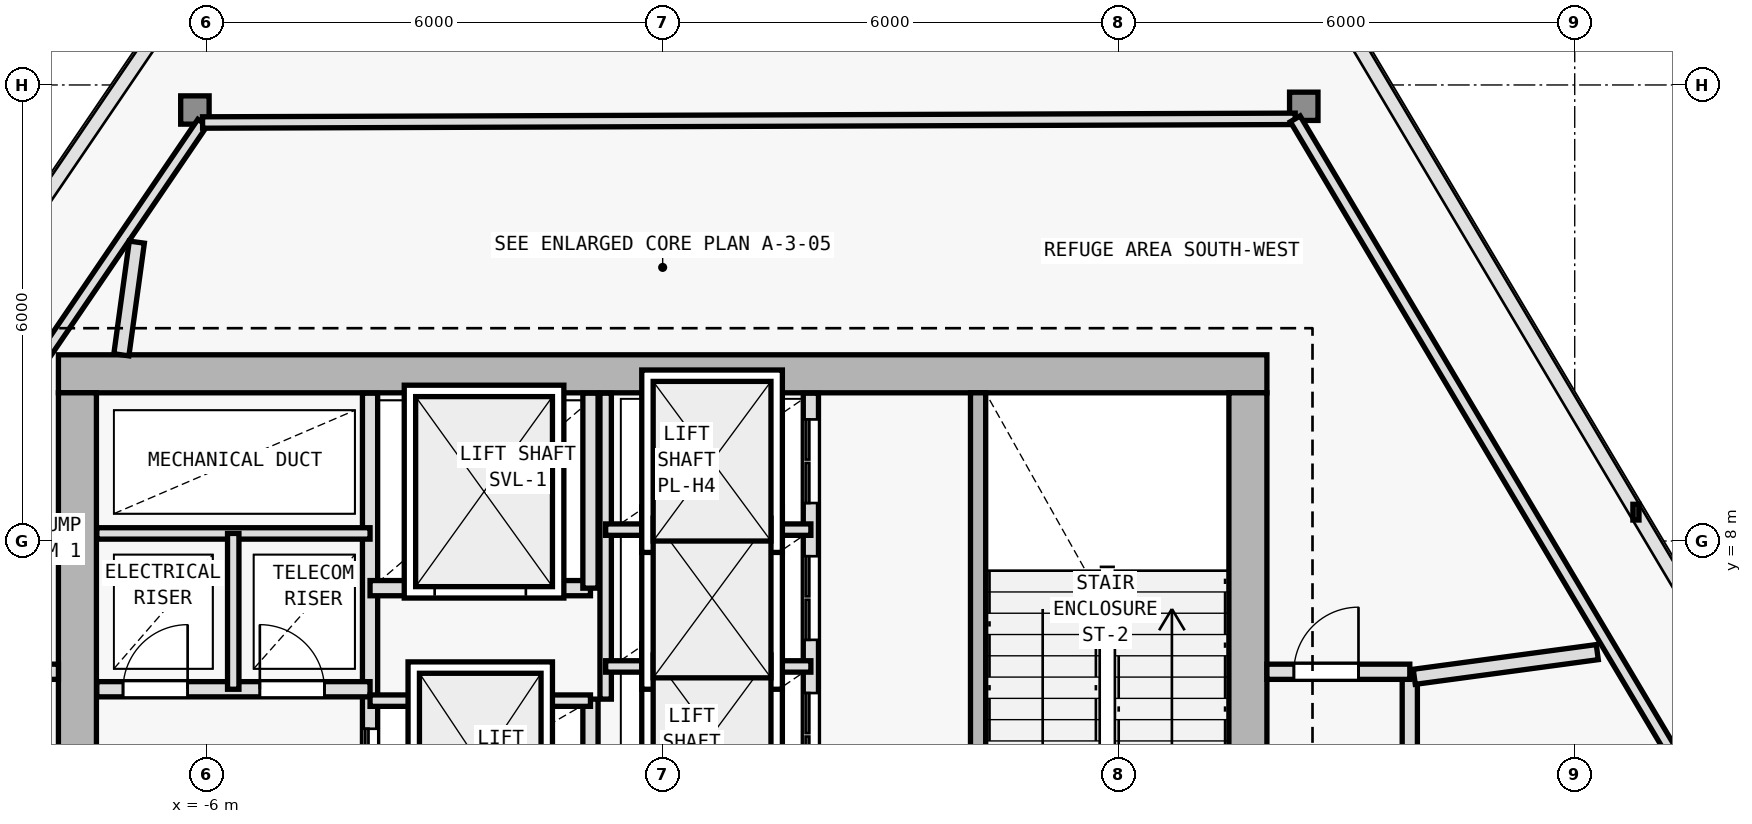
"""IFC4 building model, lengths in metres.
Left out: names, types, materials, properties, quantities, classifications, styles, units other than length and angle.
Written with IfcOpenShell. Run it as: python <this file> out.ifc"""

import sys

from ifc_helpers import new_model, si_unit, direction, frame, frame_2d, origin, origin_2d, place, context, subcontext, project, spatial, rectangle, i_section, extrude, element, fill, save


model = new_model("IFC4")
c1 = context("Model", 3, precision=1e-05, world=origin(), true_north=direction((0.0, 1.0)))
c2 = subcontext(c1, "Body", "Model", "MODEL_VIEW")
j1 = project(units=[si_unit("LENGTHUNIT", "METRE"), si_unit("PLANEANGLEUNIT", "RADIAN")], contexts=[c1])
p1 = place(None, origin())
s1 = spatial("IfcSite", under=j1, at=p1, CompositionType="ELEMENT")
p2 = place(p1, origin())
s2 = spatial("IfcBuilding", under=s1, at=p2, CompositionType="ELEMENT")
p3 = place(p2, frame((0.0, 0.0, 241.5)))
s3 = spatial("IfcBuildingStorey", under=s2, at=p3, CompositionType="ELEMENT", Elevation=241.5)
for number, where, z_axis, x_axis in (
    (1, (7.7, 10.2, 0.0), (0.0, 0.0, 1.0), (1.0, 0.0, 0.0)),
    (2, (-7.7, 10.2, 0.0), (0.0, 0.0, 1.0), (1.0, 0.0, 0.0)),
):
    element("IfcColumn", number, at=place(p3, frame(where, z_axis=z_axis, x_axis=x_axis)), inside=s3, PredefinedType="COLUMN", context=c2, shape_type="SweptSolid", body=[
        extrude(i_section(OverallWidth=0.398, OverallDepth=0.387, WebThickness=0.013, FlangeThickness=0.022, FilletRadius=0.015, at=origin_2d()), origin(), (0.0, 0.0, 1.0), 4.8),
    ])
p4 = place(p3, frame((8.435, 13.719, 0.006), z_axis=(-0.009074296177, -0.001988188488, 0.999956851197), x_axis=(0.214024191307, -0.976828360325, 0.0)))
e3 = element("IfcColumn", 3, at=p4, inside=s3, PredefinedType="COLUMN", context=c2, shape_type="SweptSolid", body=[
    extrude(i_section(OverallWidth=0.374, OverallDepth=0.372, WebThickness=0.012, FlangeThickness=0.02, FilletRadius=0.015, at=origin_2d()), origin(), (0.0, 0.0, 1.0), 4.789),
])
p5 = place(p3, frame((-6.154, 13.671, 0.006), z_axis=(0.006729378041, -0.00198822533, 0.999975380913), x_axis=(0.283346141017, 0.959017708059, 0.0)))
e4 = element("IfcColumn", 4, at=p5, inside=s3, PredefinedType="COLUMN", context=c2, shape_type="SweptSolid", body=[
    extrude(i_section(OverallWidth=0.374, OverallDepth=0.372, WebThickness=0.012, FlangeThickness=0.02, FilletRadius=0.015, at=origin_2d()), origin(), (0.0, 0.0, 1.0), 4.789),
])
p6 = place(p3, frame((7.95, 10.2, 0.0), z_axis=(0.0, 0.0, 1.0), x_axis=(-1.0, 0.0, 0.0)))
e5 = element("IfcWall", 5, at=p6, inside=s3, PredefinedType="SHEAR", context=c2, shape_type="SweptSolid", body=[
    extrude(rectangle(XDim=15.9, YDim=0.5, at=frame_2d((7.95, 0.0))), origin(), (0.0, 0.0, 1.0), 4.5),
])
p7 = place(p3, frame((-7.7, -9.15, 0.0), z_axis=(0.0, 0.0, 1.0), x_axis=(0.0, 1.0, 0.0)))
e6 = element("IfcWall", 6, at=p7, inside=s3, PredefinedType="SHEAR", context=c2, shape_type="SweptSolid", body=[
    extrude(rectangle(XDim=19.1, YDim=0.5, at=frame_2d((9.55, 0.0))), origin(), (0.0, 0.0, 1.0), 4.5),
])
p8 = place(p7, frame((12.7, 0.0, 0.0)))
e7 = element("IfcOpeningElement", 7, at=p8, cuts=e6, PredefinedType="OPENING", context=c2, shape_type="SweptSolid", body=[
    extrude(rectangle(XDim=1.1, YDim=2.15, at=frame_2d((0.55, 1.075))), frame((0.0, 0.26, 0.0), z_axis=(0.0, -1.0, 0.0), x_axis=(1.0, 0.0, 0.0)), (0.0, 0.0, 1.0), 0.52),
])
p9 = place(p3, frame((7.7, 9.95, 0.0), z_axis=(0.0, 0.0, 1.0), x_axis=(0.0, -1.0, 0.0)))
e8 = element("IfcWall", 8, at=p9, inside=s3, PredefinedType="SHEAR", context=c2, shape_type="SweptSolid", body=[
    extrude(rectangle(XDim=19.1, YDim=0.5, at=frame_2d((9.55, 0.0))), origin(), (0.0, 0.0, 1.0), 4.5),
])
p10 = place(p3, frame((-3.85, 1.35, 0.0), z_axis=(0.0, 0.0, 1.0), x_axis=(0.0, 1.0, 0.0)))
e9 = element("IfcWall", 9, at=p10, inside=s3, PredefinedType="SOLIDWALL", context=c2, shape_type="SweptSolid", body=[
    extrude(rectangle(XDim=8.595, YDim=0.2, at=frame_2d((4.297, 0.0))), origin(), (0.0, 0.0, 1.0), 4.5),
])
p11 = place(p10, frame((1.5, 0.0, 0.0)))
e10 = element("IfcOpeningElement", 10, at=p11, cuts=e9, PredefinedType="OPENING", context=c2, shape_type="SweptSolid", body=[
    extrude(rectangle(XDim=1.0, YDim=2.15, at=frame_2d((0.5, 1.075))), frame((0.0, 0.11, 0.0), z_axis=(0.0, -1.0, 0.0), x_axis=(1.0, 0.0, 0.0)), (0.0, 0.0, 1.0), 0.22),
])
p12 = place(p10, frame((3.18, 0.0, 0.0)))
e11 = element("IfcOpeningElement", 11, at=p12, cuts=e9, PredefinedType="OPENING", context=c2, shape_type="SweptSolid", body=[
    extrude(rectangle(XDim=1.0, YDim=2.15, at=frame_2d((0.5, 1.075))), frame((0.0, 0.11, 0.0), z_axis=(0.0, -1.0, 0.0), x_axis=(1.0, 0.0, 0.0)), (0.0, 0.0, 1.0), 0.22),
])
p13 = place(p3, frame((-7.445, 6.05, 0.0), z_axis=(0.0, 0.0, 1.0), x_axis=(1.0, 0.0, 0.0)))
e12 = element("IfcWall", 12, at=p13, inside=s3, PredefinedType="SOLIDWALL", context=c2, shape_type="SweptSolid", body=[
    extrude(rectangle(XDim=3.595, YDim=0.2, at=frame_2d((1.797, 0.0))), origin(), (0.0, 0.0, 1.0), 4.5),
])
p14 = place(p13, frame((0.345, 0.0, 0.0)))
e13 = element("IfcOpeningElement", 13, at=p14, cuts=e12, PredefinedType="OPENING", context=c2, shape_type="SweptSolid", body=[
    extrude(rectangle(XDim=0.85, YDim=2.1, at=frame_2d((0.425, 1.05))), frame((0.0, 0.11, 0.0), z_axis=(0.0, -1.0, 0.0), x_axis=(1.0, 0.0, 0.0)), (0.0, 0.0, 1.0), 0.22),
])
p15 = place(p13, frame((2.145, 0.0, 0.0)))
e14 = element("IfcOpeningElement", 14, at=p15, cuts=e12, PredefinedType="OPENING", context=c2, shape_type="SweptSolid", body=[
    extrude(rectangle(XDim=0.85, YDim=2.1, at=frame_2d((0.425, 1.05))), frame((0.0, 0.11, 0.0), z_axis=(0.0, -1.0, 0.0), x_axis=(1.0, 0.0, 0.0)), (0.0, 0.0, 1.0), 0.22),
])
p16 = place(p3, frame((-7.445, 8.1, 0.0), z_axis=(0.0, 0.0, 1.0), x_axis=(1.0, 0.0, 0.0)))
e15 = element("IfcWall", 15, at=p16, inside=s3, PredefinedType="PARTITIONING", context=c2, shape_type="SweptSolid", body=[
    extrude(rectangle(XDim=3.595, YDim=0.15, at=frame_2d((1.797, 0.0))), origin(), (0.0, 0.0, 1.0), 4.5),
])
p17 = place(p3, frame((-5.65, 6.05, 0.0), z_axis=(0.0, 0.0, 1.0), x_axis=(0.0, 1.0, 0.0)))
e16 = element("IfcWall", 16, at=p17, inside=s3, PredefinedType="PARTITIONING", context=c2, shape_type="SweptSolid", body=[
    extrude(rectangle(XDim=2.05, YDim=0.15, at=frame_2d((1.025, 0.0))), origin(), (0.0, 0.0, 1.0), 4.5),
])
p18 = place(p3, frame((4.15, 2.75, 0.0), z_axis=(0.0, 0.0, 1.0), x_axis=(0.0, 1.0, 0.0)))
e17 = element("IfcWall", 17, at=p18, inside=s3, PredefinedType="SOLIDWALL", context=c2, shape_type="SweptSolid", body=[
    extrude(rectangle(XDim=7.2, YDim=0.2, at=frame_2d((3.6, 0.0))), origin(), (0.0, 0.0, 1.0), 4.5),
])
p19 = place(p18, frame((0.35, 0.0, 0.0)))
e18 = element("IfcOpeningElement", 18, at=p19, cuts=e17, PredefinedType="OPENING", context=c2, shape_type="SweptSolid", body=[
    extrude(rectangle(XDim=1.0, YDim=2.15, at=frame_2d((0.5, 1.075))), frame((0.0, 0.11, 0.0), z_axis=(0.0, -1.0, 0.0), x_axis=(1.0, 0.0, 0.0)), (0.0, 0.0, 1.0), 0.22),
])
p20 = place(p3, frame((-0.95, 2.65, 0.0), z_axis=(0.0, 0.0, 1.0), x_axis=(0.0, 1.0, 0.0)))
e19 = element("IfcWall", 19, at=p20, inside=s3, PredefinedType="SOLIDWALL", context=c2, shape_type="SweptSolid", body=[
    extrude(rectangle(XDim=3.27, YDim=0.2, at=frame_2d((1.635, 0.0))), origin(), (0.0, 0.0, 1.0), 4.5),
])
p21 = place(p3, frame((-3.85, 5.9, 0.0), z_axis=(0.0, 0.0, 1.0), x_axis=(1.0, 0.0, 0.0)))
e20 = element("IfcWall", 20, at=p21, inside=s3, PredefinedType="PARTITIONING", context=c2, shape_type="SweptSolid", body=[
    extrude(rectangle(XDim=2.9, YDim=0.15, at=frame_2d((1.45, 0.0))), origin(), (0.0, 0.0, 1.0), 4.5),
])
p22 = place(p3, frame((-3.85, 7.38, 0.0), z_axis=(0.0, 0.0, 1.0), x_axis=(1.0, 0.0, 0.0)))
e21 = element("IfcWall", 21, at=p22, inside=s3, PredefinedType="SOLIDWALL", context=c2, shape_type="SweptSolid", body=[
    extrude(rectangle(XDim=2.9, YDim=0.2, at=frame_2d((1.45, 0.0))), origin(), (0.0, 0.0, 1.0), 4.5),
])
p23 = place(p22, frame((0.85, 0.0, 0.0)))
e22 = element("IfcOpeningElement", 22, at=p23, cuts=e21, PredefinedType="OPENING", context=c2, shape_type="SweptSolid", body=[
    extrude(rectangle(XDim=1.2, YDim=2.2, at=frame_2d((0.6, 1.1))), frame((0.0, 0.11, 0.0), z_axis=(0.0, -1.0, 0.0), x_axis=(1.0, 0.0, 0.0)), (0.0, 0.0, 1.0), 0.22),
])
p24 = place(p3, frame((-0.95, 7.38, 0.0), z_axis=(0.0, 0.0, 1.0), x_axis=(0.0, 1.0, 0.0)))
e23 = element("IfcWall", 23, at=p24, inside=s3, PredefinedType="SOLIDWALL", context=c2, shape_type="SweptSolid", body=[
    extrude(rectangle(XDim=2.565, YDim=0.2, at=frame_2d((1.283, 0.0))), origin(), (0.0, 0.0, 1.0), 4.5),
])
p25 = place(p3, frame((1.95, 2.65, 0.0), z_axis=(0.0, 0.0, 1.0), x_axis=(0.0, 1.0, 0.0)))
e24 = element("IfcWall", 24, at=p25, inside=s3, PredefinedType="SOLIDWALL", context=c2, shape_type="SweptSolid", body=[
    extrude(rectangle(XDim=7.295, YDim=0.2, at=frame_2d((3.647, 0.0))), origin(), (0.0, 0.0, 1.0), 4.5),
])
p26 = place(p25, frame((0.45, 0.0, 0.0)))
e25 = element("IfcOpeningElement", 25, at=p26, cuts=e24, PredefinedType="OPENING", context=c2, shape_type="SweptSolid", body=[
    extrude(rectangle(XDim=1.1, YDim=2.15, at=frame_2d((0.55, 1.075))), frame((0.0, 0.11, 0.0), z_axis=(0.0, -1.0, 0.0), x_axis=(1.0, 0.0, 0.0)), (0.0, 0.0, 1.0), 0.22),
])
p27 = place(p25, frame((2.25, 0.0, 0.0)))
e26 = element("IfcOpeningElement", 26, at=p27, cuts=e24, PredefinedType="OPENING", context=c2, shape_type="SweptSolid", body=[
    extrude(rectangle(XDim=1.1, YDim=2.15, at=frame_2d((0.55, 1.075))), frame((0.0, 0.11, 0.0), z_axis=(0.0, -1.0, 0.0), x_axis=(1.0, 0.0, 0.0)), (0.0, 0.0, 1.0), 0.22),
])
p28 = place(p25, frame((4.05, 0.0, 0.0)))
e27 = element("IfcOpeningElement", 27, at=p28, cuts=e24, PredefinedType="OPENING", context=c2, shape_type="SweptSolid", body=[
    extrude(rectangle(XDim=1.1, YDim=2.15, at=frame_2d((0.55, 1.075))), frame((0.0, 0.11, 0.0), z_axis=(0.0, -1.0, 0.0), x_axis=(1.0, 0.0, 0.0)), (0.0, 0.0, 1.0), 0.22),
])
p29 = place(p25, frame((5.85, 0.0, 0.0)))
e28 = element("IfcOpeningElement", 28, at=p29, cuts=e24, PredefinedType="OPENING", context=c2, shape_type="SweptSolid", body=[
    extrude(rectangle(XDim=1.1, YDim=2.15, at=frame_2d((0.55, 1.075))), frame((0.0, 0.11, 0.0), z_axis=(0.0, -1.0, 0.0), x_axis=(1.0, 0.0, 0.0)), (0.0, 0.0, 1.0), 0.22),
])
p30 = place(p3, frame((-0.75, 5.92, 0.0), z_axis=(0.0, 0.0, 1.0), x_axis=(0.0, 1.0, 0.0)))
e29 = element("IfcWall", 29, at=p30, inside=s3, PredefinedType="PARTITIONING", context=c2, shape_type="SweptSolid", body=[
    extrude(rectangle(XDim=4.025, YDim=0.15, at=frame_2d((2.013, 0.0))), origin(), (0.0, 0.0, 1.0), 4.5),
])
for number, where, z_axis, x_axis in (
    (30, (-0.75, 6.35, 0.0), (0.0, 0.0, 1.0), (1.0, 0.0, 0.0)),
    (31, (-0.75, 8.15, 0.0), (0.0, 0.0, 1.0), (1.0, 0.0, 0.0)),
):
    element("IfcWall", number, at=place(p3, frame(where, z_axis=z_axis, x_axis=x_axis)), inside=s3, PredefinedType="PARTITIONING", context=c2, shape_type="SweptSolid", body=[
        extrude(rectangle(XDim=2.7, YDim=0.15, at=frame_2d((1.35, 0.0))), origin(), (0.0, 0.0, 1.0), 4.5),
    ])
p31 = place(p3, frame((-12.47, 4.073, 0.0), z_axis=(0.0, 0.0, 1.0), x_axis=(0.562473312613, 0.826815440469, 0.0)))
e32 = element("IfcWall", 32, at=p31, inside=s3, PredefinedType="PARTITIONING", context=c2, shape_type="SweptSolid", body=[
    extrude(rectangle(XDim=11.409, YDim=0.15, at=frame_2d((5.705, 0.0))), origin(), (0.0, 0.0, 1.0), 3.925),
])
p32 = place(p3, frame((-6.053, 13.506, 0.0), z_axis=(0.0, 0.0, 1.0), x_axis=(0.999994346507, 0.003362581401, 0.0)))
e33 = element("IfcWall", 33, at=p32, inside=s3, PredefinedType="PARTITIONING", context=c2, shape_type="SweptSolid", body=[
    extrude(rectangle(XDim=14.376, YDim=0.15, at=frame_2d((7.188, 0.0))), origin(), (0.0, 0.0, 1.0), 4.125),
])
p33 = place(p3, frame((8.323, 13.554, 0.0), z_axis=(0.0, 0.0, 1.0), x_axis=(0.51109940129, -0.859521612294, 0.0)))
e34 = element("IfcWall", 34, at=p33, inside=s3, PredefinedType="PARTITIONING", context=c2, shape_type="SweptSolid", body=[
    extrude(rectangle(XDim=10.965, YDim=0.15, at=frame_2d((5.482, 0.0))), origin(), (0.0, 0.0, 1.0), 4.125),
])
p34 = place(p3, frame((-9.83, 6.28, 0.0), z_axis=(0.0, 0.0, 1.0), x_axis=(1.0, 0.0, 0.0)))
e35 = element("IfcWall", 35, at=p34, inside=s3, PredefinedType="SOLIDWALL", context=c2, shape_type="SweptSolid", body=[
    extrude(rectangle(XDim=1.88, YDim=0.2, at=frame_2d((0.94, 0.0))), origin(), (0.0, 0.0, 1.0), 3.925),
])
p35 = place(p34, frame((0.565, 0.0, 0.0)))
e36 = element("IfcOpeningElement", 36, at=p35, cuts=e35, PredefinedType="OPENING", context=c2, shape_type="SweptSolid", body=[
    extrude(rectangle(XDim=0.85, YDim=2.1, at=frame_2d((0.425, 1.05))), frame((0.0, 0.11, 0.0), z_axis=(0.0, -1.0, 0.0), x_axis=(1.0, 0.0, 0.0)), (0.0, 0.0, 1.0), 0.22),
])
p36 = place(p3, frame((9.83, -11.53, 0.0), z_axis=(0.0, 0.0, 1.0), x_axis=(0.0, 1.0, 0.0)))
e37 = element("IfcWall", 37, at=p36, inside=s3, PredefinedType="SOLIDWALL", context=c2, shape_type="SweptSolid", body=[
    extrude(rectangle(XDim=17.81, YDim=0.2, at=frame_2d((8.905, 0.0))), origin(), (0.0, 0.0, 1.0), 3.875),
])
p37 = place(p36, frame((3.256, 0.0, 0.0)))
e38 = element("IfcOpeningElement", 38, at=p37, cuts=e37, PredefinedType="OPENING", context=c2, shape_type="SweptSolid", body=[
    extrude(rectangle(XDim=1.0, YDim=2.15, at=frame_2d((0.5, 1.075))), frame((0.0, 0.11, 0.0), z_axis=(0.0, -1.0, 0.0), x_axis=(1.0, 0.0, 0.0)), (0.0, 0.0, 1.0), 0.22),
])
p38 = place(p36, frame((12.008, 0.0, 0.0)))
e39 = element("IfcOpeningElement", 39, at=p38, cuts=e37, PredefinedType="OPENING", context=c2, shape_type="SweptSolid", body=[
    extrude(rectangle(XDim=1.0, YDim=2.15, at=frame_2d((0.5, 1.075))), frame((0.0, 0.11, 0.0), z_axis=(0.0, -1.0, 0.0), x_axis=(1.0, 0.0, 0.0)), (0.0, 0.0, 1.0), 0.22),
])
p39 = place(p3, frame((7.95, 6.28, 0.0), z_axis=(0.0, 0.0, 1.0), x_axis=(1.0, 0.0, 0.0)))
e40 = element("IfcWall", 40, at=p39, inside=s3, PredefinedType="SOLIDWALL", context=c2, shape_type="SweptSolid", body=[
    extrude(rectangle(XDim=1.88, YDim=0.2, at=frame_2d((0.94, 0.0))), origin(), (0.0, 0.0, 1.0), 4.205),
])
p40 = place(p39, frame((0.355, 0.0, 0.0)))
e41 = element("IfcOpeningElement", 41, at=p40, cuts=e40, PredefinedType="OPENING", context=c2, shape_type="SweptSolid", body=[
    extrude(rectangle(XDim=0.85, YDim=2.1, at=frame_2d((0.425, 1.05))), frame((0.0, 0.11, 0.0), z_axis=(0.0, -1.0, 0.0), x_axis=(1.0, 0.0, 0.0)), (0.0, 0.0, 1.0), 0.22),
])
p41 = place(p3, frame((9.889, 6.214, 0.0), z_axis=(0.0, 0.0, 1.0), x_axis=(0.991015123337, 0.133749860998, 0.0)))
e42 = element("IfcWall", 42, at=p41, inside=s3, PredefinedType="SOLIDWALL", context=c2, shape_type="SweptSolid", body=[
    extrude(rectangle(XDim=2.429, YDim=0.2, at=frame_2d((1.215, 0.0))), origin(), (0.0, 0.0, 1.0), 4.5),
])
p42 = place(p3, frame((-7.122, 10.45, 0.0), z_axis=(0.0, 0.0, 1.0), x_axis=(0.135914078288, 0.990720628292, 0.0)))
e43 = element("IfcWall", 43, at=p42, inside=s3, PredefinedType="SOLIDWALL", context=c2, shape_type="SweptSolid", body=[
    extrude(rectangle(XDim=1.496, YDim=0.2, at=frame_2d((0.748, 0.0))), origin(), (0.0, 0.0, 1.0), 3.925),
])
p43 = place(p14, origin())
e44 = element("IfcDoor", 44, at=p43, inside=s3, OperationType="SINGLE_SWING_RIGHT", PredefinedType="DOOR", context=c2, shape_type="SweptSolid", body=[
    extrude(rectangle(XDim=0.85, YDim=2.1, at=frame_2d((0.425, 1.05))), frame((0.0, 0.025, 0.0), z_axis=(0.0, -1.0, 0.0), x_axis=(1.0, 0.0, 0.0)), (0.0, 0.0, 1.0), 0.05),
])
fill(e13, e44)
p44 = place(p15, origin())
e45 = element("IfcDoor", 45, at=p44, inside=s3, OperationType="SINGLE_SWING_LEFT", PredefinedType="DOOR", context=c2, shape_type="SweptSolid", body=[
    extrude(rectangle(XDim=0.85, YDim=2.1, at=frame_2d((0.425, 1.05))), frame((0.0, 0.025, 0.0), z_axis=(0.0, -1.0, 0.0), x_axis=(1.0, 0.0, 0.0)), (0.0, 0.0, 1.0), 0.05),
])
fill(e14, e45)
p45 = place(p23, origin())
e46 = element("IfcDoor", 46, at=p45, inside=s3, OperationType="DOUBLE_DOOR_SLIDING", PredefinedType="DOOR", context=c2, shape_type="SweptSolid", body=[
    extrude(rectangle(XDim=1.2, YDim=2.2, at=frame_2d((0.6, 1.1))), frame((0.0, 0.025, 0.0), z_axis=(0.0, -1.0, 0.0), x_axis=(1.0, 0.0, 0.0)), (0.0, 0.0, 1.0), 0.05),
])
fill(e22, e46)
p46 = place(p27, origin())
e47 = element("IfcDoor", 47, at=p46, inside=s3, OperationType="DOUBLE_DOOR_SLIDING", PredefinedType="DOOR", context=c2, shape_type="SweptSolid", body=[
    extrude(rectangle(XDim=1.1, YDim=2.15, at=frame_2d((0.55, 1.075))), frame((0.0, 0.025, 0.0), z_axis=(0.0, -1.0, 0.0), x_axis=(1.0, 0.0, 0.0)), (0.0, 0.0, 1.0), 0.05),
])
fill(e26, e47)
p47 = place(p28, origin())
e48 = element("IfcDoor", 48, at=p47, inside=s3, OperationType="DOUBLE_DOOR_SLIDING", PredefinedType="DOOR", context=c2, shape_type="SweptSolid", body=[
    extrude(rectangle(XDim=1.1, YDim=2.15, at=frame_2d((0.55, 1.075))), frame((0.0, 0.025, 0.0), z_axis=(0.0, -1.0, 0.0), x_axis=(1.0, 0.0, 0.0)), (0.0, 0.0, 1.0), 0.05),
])
fill(e27, e48)
p48 = place(p29, origin())
e49 = element("IfcDoor", 49, at=p48, inside=s3, OperationType="DOUBLE_DOOR_SLIDING", PredefinedType="DOOR", context=c2, shape_type="SweptSolid", body=[
    extrude(rectangle(XDim=1.1, YDim=2.15, at=frame_2d((0.55, 1.075))), frame((0.0, 0.025, 0.0), z_axis=(0.0, -1.0, 0.0), x_axis=(1.0, 0.0, 0.0)), (0.0, 0.0, 1.0), 0.05),
])
fill(e28, e49)
p49 = place(p12, origin())
e50 = element("IfcDoor", 50, at=p49, inside=s3, OperationType="DOUBLE_DOOR_SLIDING", PredefinedType="DOOR", context=c2, shape_type="SweptSolid", body=[
    extrude(rectangle(XDim=1.0, YDim=2.15, at=frame_2d((0.5, 1.075))), frame((0.0, 0.025, 0.0), z_axis=(0.0, -1.0, 0.0), x_axis=(1.0, 0.0, 0.0)), (0.0, 0.0, 1.0), 0.05),
])
fill(e11, e50)
p50 = place(p40, origin())
e51 = element("IfcDoor", 51, at=p50, inside=s3, OperationType="SINGLE_SWING_RIGHT", PredefinedType="DOOR", context=c2, shape_type="SweptSolid", body=[
    extrude(rectangle(XDim=0.85, YDim=2.1, at=frame_2d((0.425, 1.05))), frame((0.0, 0.025, 0.0), z_axis=(0.0, -1.0, 0.0), x_axis=(1.0, 0.0, 0.0)), (0.0, 0.0, 1.0), 0.05),
])
fill(e41, e51)
save(model, sys.argv[1])
